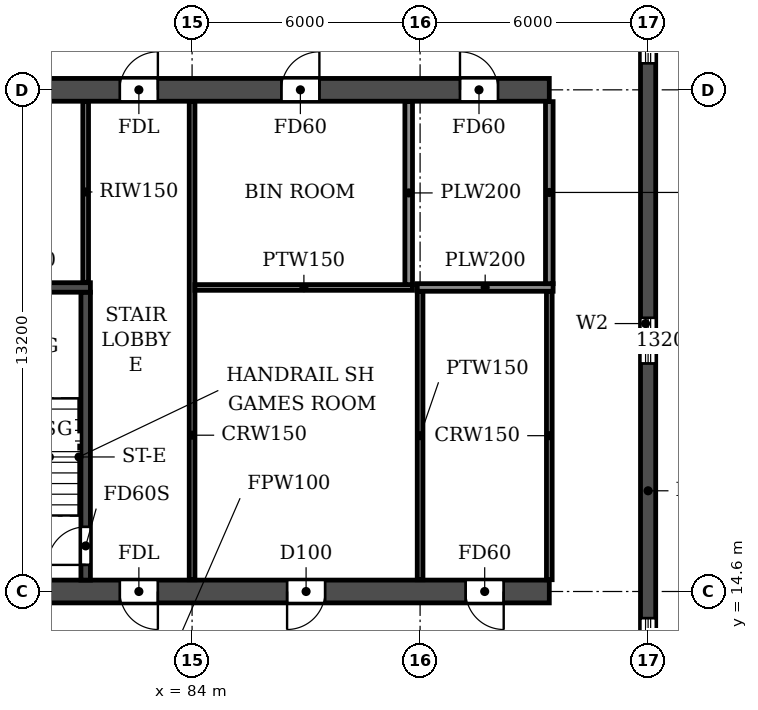
"""IFC4 building model, lengths in metres.
Left out: names, types, materials, properties, quantities, classifications, styles, units other than length and angle.
Written with IfcOpenShell. Run it as: python <this file> out.ifc"""

import sys

from ifc_helpers import new_model, si_unit, direction, frame, frame_2d, origin, place, context, subcontext, project, spatial, rectangle, extrude, element, fill, save


model = new_model("IFC4")
c1 = context("Model", 3, precision=1e-05, world=origin(), true_north=direction((0.0, 1.0)))
c2 = subcontext(c1, "Body", "Model", "MODEL_VIEW")
j1 = project(units=[si_unit("LENGTHUNIT", "METRE"), si_unit("PLANEANGLEUNIT", "RADIAN")], contexts=[c1])
p1 = place(None, origin())
s1 = spatial("IfcSite", under=j1, at=p1, CompositionType="ELEMENT")
p2 = place(p1, origin())
s2 = spatial("IfcBuilding", under=s1, at=p2, CompositionType="ELEMENT")
p3 = place(p2, frame((0.0, 0.0, 56.4)))
s3 = spatial("IfcBuildingStorey", under=s2, at=p3, CompositionType="ELEMENT", Elevation=56.4)
p4 = place(p3, frame((96.0, 4.683, 0.0), z_axis=(0.0, 0.0, 1.0), x_axis=(0.0, 1.0, 0.0)))
e1 = element("IfcWall", 1, at=p4, inside=s3, PredefinedType="SHEAR", context=c2, shape_type="SweptSolid", body=[
    extrude(rectangle(XDim=35.434, YDim=0.4, at=frame_2d((17.717, 0.0))), origin(), (0.0, 0.0, 1.0), 3.05),
])
p5 = place(p4, frame((15.917, 0.0, 0.9)))
e2 = element("IfcOpeningElement", 2, at=p5, cuts=e1, PredefinedType="OPENING", context=c2, shape_type="SweptSolid", body=[
    extrude(rectangle(XDim=1.2, YDim=1.5, at=frame_2d((0.6, 0.75))), frame((0.0, 0.21, 0.0), z_axis=(0.0, -1.0, 0.0), x_axis=(1.0, 0.0, 0.0)), (0.0, 0.0, 1.0), 0.42),
])
p6 = place(p4, frame((23.817, 0.0, 0.9)))
e3 = element("IfcOpeningElement", 3, at=p6, cuts=e1, PredefinedType="OPENING", context=c2, shape_type="SweptSolid", body=[
    extrude(rectangle(XDim=1.2, YDim=1.5, at=frame_2d((0.6, 0.75))), frame((0.0, 0.21, 0.0), z_axis=(0.0, -1.0, 0.0), x_axis=(1.0, 0.0, 0.0)), (0.0, 0.0, 1.0), 0.42),
])
p7 = place(p4, frame((8.017, 0.0, 0.9)))
e4 = element("IfcOpeningElement", 4, at=p7, cuts=e1, PredefinedType="OPENING", context=c2, shape_type="SweptSolid", body=[
    extrude(rectangle(XDim=1.2, YDim=1.5, at=frame_2d((0.6, 0.75))), frame((0.0, 0.21, 0.0), z_axis=(0.0, -1.0, 0.0), x_axis=(1.0, 0.0, 0.0)), (0.0, 0.0, 1.0), 0.42),
])
p8 = place(p4, frame((29.493, 0.0, 0.6)))
e5 = element("IfcOpeningElement", 5, at=p8, cuts=e1, PredefinedType="OPENING", context=c2, shape_type="SweptSolid", body=[
    extrude(rectangle(XDim=2.2, YDim=1.8, at=frame_2d((1.1, 0.9))), frame((0.0, 0.21, 0.0), z_axis=(0.0, -1.0, 0.0), x_axis=(1.0, 0.0, 0.0)), (0.0, 0.0, 1.0), 0.42),
])
p9 = place(p4, frame((2.541, 0.0, 0.6)))
e6 = element("IfcOpeningElement", 6, at=p9, cuts=e1, PredefinedType="OPENING", context=c2, shape_type="SweptSolid", body=[
    extrude(rectangle(XDim=2.2, YDim=1.8, at=frame_2d((1.1, 0.9))), frame((0.0, 0.21, 0.0), z_axis=(0.0, -1.0, 0.0), x_axis=(1.0, 0.0, 0.0)), (0.0, 0.0, 1.0), 0.42),
])
p10 = place(p3, frame((8.6, 14.6, 0.0), z_axis=(0.0, 0.0, 1.0), x_axis=(1.0, 0.0, 0.0)))
e7 = element("IfcWall", 7, at=p10, inside=s3, PredefinedType="SOLIDWALL", context=c2, shape_type="SweptSolid", body=[
    extrude(rectangle(XDim=84.8, YDim=0.6, at=frame_2d((42.4, 0.0))), origin(), (0.0, 0.0, 1.0), 3.05),
])
p11 = place(p10, frame((1.35, 0.0, 0.0)))
e8 = element("IfcOpeningElement", 8, at=p11, cuts=e7, PredefinedType="OPENING", context=c2, shape_type="SweptSolid", body=[
    extrude(rectangle(XDim=1.0, YDim=2.1, at=frame_2d((0.5, 1.05))), frame((0.0, 0.31, 0.0), z_axis=(0.0, -1.0, 0.0), x_axis=(1.0, 0.0, 0.0)), (0.0, 0.0, 1.0), 0.62),
])
p12 = place(p10, frame((6.05, 0.0, 0.0)))
e9 = element("IfcOpeningElement", 9, at=p12, cuts=e7, PredefinedType="OPENING", context=c2, shape_type="SweptSolid", body=[
    extrude(rectangle(XDim=1.0, YDim=2.1, at=frame_2d((0.5, 1.05))), frame((0.0, 0.31, 0.0), z_axis=(0.0, -1.0, 0.0), x_axis=(1.0, 0.0, 0.0)), (0.0, 0.0, 1.0), 0.62),
])
p13 = place(p10, frame((10.3, 0.0, 0.0)))
e10 = element("IfcOpeningElement", 10, at=p13, cuts=e7, PredefinedType="OPENING", context=c2, shape_type="SweptSolid", body=[
    extrude(rectangle(XDim=1.0, YDim=2.1, at=frame_2d((0.5, 1.05))), frame((0.0, 0.31, 0.0), z_axis=(0.0, -1.0, 0.0), x_axis=(1.0, 0.0, 0.0)), (0.0, 0.0, 1.0), 0.62),
])
p14 = place(p10, frame((18.2, 0.0, 0.0)))
e11 = element("IfcOpeningElement", 11, at=p14, cuts=e7, PredefinedType="OPENING", context=c2, shape_type="SweptSolid", body=[
    extrude(rectangle(XDim=1.0, YDim=2.1, at=frame_2d((0.5, 1.05))), frame((0.0, 0.31, 0.0), z_axis=(0.0, -1.0, 0.0), x_axis=(1.0, 0.0, 0.0)), (0.0, 0.0, 1.0), 0.62),
])
p15 = place(p10, frame((22.8, 0.0, 0.0)))
e12 = element("IfcOpeningElement", 12, at=p15, cuts=e7, PredefinedType="OPENING", context=c2, shape_type="SweptSolid", body=[
    extrude(rectangle(XDim=1.0, YDim=2.1, at=frame_2d((0.5, 1.05))), frame((0.0, 0.31, 0.0), z_axis=(0.0, -1.0, 0.0), x_axis=(1.0, 0.0, 0.0)), (0.0, 0.0, 1.0), 0.62),
])
p16 = place(p10, frame((35.4, 0.0, 0.0)))
e13 = element("IfcOpeningElement", 13, at=p16, cuts=e7, PredefinedType="OPENING", context=c2, shape_type="SweptSolid", body=[
    extrude(rectangle(XDim=1.0, YDim=2.1, at=frame_2d((0.5, 1.05))), frame((0.0, 0.31, 0.0), z_axis=(0.0, -1.0, 0.0), x_axis=(1.0, 0.0, 0.0)), (0.0, 0.0, 1.0), 0.62),
])
p17 = place(p10, frame((39.3, 0.0, 0.0)))
e14 = element("IfcOpeningElement", 14, at=p17, cuts=e7, PredefinedType="OPENING", context=c2, shape_type="SweptSolid", body=[
    extrude(rectangle(XDim=1.0, YDim=2.1, at=frame_2d((0.5, 1.05))), frame((0.0, 0.31, 0.0), z_axis=(0.0, -1.0, 0.0), x_axis=(1.0, 0.0, 0.0)), (0.0, 0.0, 1.0), 0.62),
])
p18 = place(p10, frame((41.9, 0.0, 0.0)))
e15 = element("IfcOpeningElement", 15, at=p18, cuts=e7, PredefinedType="OPENING", context=c2, shape_type="SweptSolid", body=[
    extrude(rectangle(XDim=1.0, YDim=2.1, at=frame_2d((0.5, 1.05))), frame((0.0, 0.31, 0.0), z_axis=(0.0, -1.0, 0.0), x_axis=(1.0, 0.0, 0.0)), (0.0, 0.0, 1.0), 0.62),
])
p19 = place(p10, frame((47.1, 0.0, 0.0)))
e16 = element("IfcOpeningElement", 16, at=p19, cuts=e7, PredefinedType="OPENING", context=c2, shape_type="SweptSolid", body=[
    extrude(rectangle(XDim=1.0, YDim=2.1, at=frame_2d((0.5, 1.05))), frame((0.0, 0.31, 0.0), z_axis=(0.0, -1.0, 0.0), x_axis=(1.0, 0.0, 0.0)), (0.0, 0.0, 1.0), 0.62),
])
p20 = place(p10, frame((61.0, 0.0, 0.0)))
e17 = element("IfcOpeningElement", 17, at=p20, cuts=e7, PredefinedType="OPENING", context=c2, shape_type="SweptSolid", body=[
    extrude(rectangle(XDim=1.0, YDim=2.1, at=frame_2d((0.5, 1.05))), frame((0.0, 0.31, 0.0), z_axis=(0.0, -1.0, 0.0), x_axis=(1.0, 0.0, 0.0)), (0.0, 0.0, 1.0), 0.62),
])
p21 = place(p10, frame((65.6, 0.0, 0.0)))
e18 = element("IfcOpeningElement", 18, at=p21, cuts=e7, PredefinedType="OPENING", context=c2, shape_type="SweptSolid", body=[
    extrude(rectangle(XDim=1.0, YDim=2.1, at=frame_2d((0.5, 1.05))), frame((0.0, 0.31, 0.0), z_axis=(0.0, -1.0, 0.0), x_axis=(1.0, 0.0, 0.0)), (0.0, 0.0, 1.0), 0.62),
])
p22 = place(p10, frame((73.5, 0.0, 0.0)))
e19 = element("IfcOpeningElement", 19, at=p22, cuts=e7, PredefinedType="OPENING", context=c2, shape_type="SweptSolid", body=[
    extrude(rectangle(XDim=1.0, YDim=2.1, at=frame_2d((0.5, 1.05))), frame((0.0, 0.31, 0.0), z_axis=(0.0, -1.0, 0.0), x_axis=(1.0, 0.0, 0.0)), (0.0, 0.0, 1.0), 0.62),
])
p23 = place(p10, frame((77.9, 0.0, 0.0)))
e20 = element("IfcOpeningElement", 20, at=p23, cuts=e7, PredefinedType="OPENING", context=c2, shape_type="SweptSolid", body=[
    extrude(rectangle(XDim=1.0, YDim=2.1, at=frame_2d((0.5, 1.05))), frame((0.0, 0.31, 0.0), z_axis=(0.0, -1.0, 0.0), x_axis=(1.0, 0.0, 0.0)), (0.0, 0.0, 1.0), 0.62),
])
p24 = place(p10, frame((82.6, 0.0, 0.0)))
e21 = element("IfcOpeningElement", 21, at=p24, cuts=e7, PredefinedType="OPENING", context=c2, shape_type="SweptSolid", body=[
    extrude(rectangle(XDim=1.0, YDim=2.1, at=frame_2d((0.5, 1.05))), frame((0.0, 0.31, 0.0), z_axis=(0.0, -1.0, 0.0), x_axis=(1.0, 0.0, 0.0)), (0.0, 0.0, 1.0), 0.62),
])
p25 = place(p3, frame((8.6, 27.8, 0.0), z_axis=(0.0, 0.0, 1.0), x_axis=(1.0, 0.0, 0.0)))
e22 = element("IfcWall", 22, at=p25, inside=s3, PredefinedType="SOLIDWALL", context=c2, shape_type="SweptSolid", body=[
    extrude(rectangle(XDim=84.8, YDim=0.6, at=frame_2d((42.4, 0.0))), origin(), (0.0, 0.0, 1.0), 3.05),
])
p26 = place(p25, frame((1.2, 0.0, 0.0)))
e23 = element("IfcOpeningElement", 23, at=p26, cuts=e22, PredefinedType="OPENING", context=c2, shape_type="SweptSolid", body=[
    extrude(rectangle(XDim=1.0, YDim=2.1, at=frame_2d((0.5, 1.05))), frame((0.0, 0.31, 0.0), z_axis=(0.0, -1.0, 0.0), x_axis=(1.0, 0.0, 0.0)), (0.0, 0.0, 1.0), 0.62),
])
p27 = place(p25, frame((5.9, 0.0, 0.0)))
e24 = element("IfcOpeningElement", 24, at=p27, cuts=e22, PredefinedType="OPENING", context=c2, shape_type="SweptSolid", body=[
    extrude(rectangle(XDim=1.0, YDim=2.1, at=frame_2d((0.5, 1.05))), frame((0.0, 0.31, 0.0), z_axis=(0.0, -1.0, 0.0), x_axis=(1.0, 0.0, 0.0)), (0.0, 0.0, 1.0), 0.62),
])
p28 = place(p25, frame((10.3, 0.0, 0.0)))
e25 = element("IfcOpeningElement", 25, at=p28, cuts=e22, PredefinedType="OPENING", context=c2, shape_type="SweptSolid", body=[
    extrude(rectangle(XDim=1.0, YDim=2.1, at=frame_2d((0.5, 1.05))), frame((0.0, 0.31, 0.0), z_axis=(0.0, -1.0, 0.0), x_axis=(1.0, 0.0, 0.0)), (0.0, 0.0, 1.0), 0.62),
])
p29 = place(p25, frame((13.65, 0.0, 0.0)))
e26 = element("IfcOpeningElement", 26, at=p29, cuts=e22, PredefinedType="OPENING", context=c2, shape_type="SweptSolid", body=[
    extrude(rectangle(XDim=0.9, YDim=2.1, at=frame_2d((0.45, 1.05))), frame((0.0, 0.31, 0.0), z_axis=(0.0, -1.0, 0.0), x_axis=(1.0, 0.0, 0.0)), (0.0, 0.0, 1.0), 0.62),
])
p30 = place(p25, frame((22.85, 0.0, 0.0)))
e27 = element("IfcOpeningElement", 27, at=p30, cuts=e22, PredefinedType="OPENING", context=c2, shape_type="SweptSolid", body=[
    extrude(rectangle(XDim=0.9, YDim=2.1, at=frame_2d((0.45, 1.05))), frame((0.0, 0.31, 0.0), z_axis=(0.0, -1.0, 0.0), x_axis=(1.0, 0.0, 0.0)), (0.0, 0.0, 1.0), 0.62),
])
p31 = place(p25, frame((27.3, 0.0, 0.0)))
e28 = element("IfcOpeningElement", 28, at=p31, cuts=e22, PredefinedType="OPENING", context=c2, shape_type="SweptSolid", body=[
    extrude(rectangle(XDim=1.0, YDim=2.1, at=frame_2d((0.5, 1.05))), frame((0.0, 0.31, 0.0), z_axis=(0.0, -1.0, 0.0), x_axis=(1.0, 0.0, 0.0)), (0.0, 0.0, 1.0), 0.62),
])
p32 = place(p25, frame((32.5, 0.0, 0.0)))
e29 = element("IfcOpeningElement", 29, at=p32, cuts=e22, PredefinedType="OPENING", context=c2, shape_type="SweptSolid", body=[
    extrude(rectangle(XDim=1.0, YDim=2.1, at=frame_2d((0.5, 1.05))), frame((0.0, 0.31, 0.0), z_axis=(0.0, -1.0, 0.0), x_axis=(1.0, 0.0, 0.0)), (0.0, 0.0, 1.0), 0.62),
])
p33 = place(p25, frame((39.0, 0.0, 0.0)))
e30 = element("IfcOpeningElement", 30, at=p33, cuts=e22, PredefinedType="OPENING", context=c2, shape_type="SweptSolid", body=[
    extrude(rectangle(XDim=1.0, YDim=2.1, at=frame_2d((0.5, 1.05))), frame((0.0, 0.31, 0.0), z_axis=(0.0, -1.0, 0.0), x_axis=(1.0, 0.0, 0.0)), (0.0, 0.0, 1.0), 0.62),
])
p34 = place(p25, frame((41.9, 0.0, 0.0)))
e31 = element("IfcOpeningElement", 31, at=p34, cuts=e22, PredefinedType="OPENING", context=c2, shape_type="SweptSolid", body=[
    extrude(rectangle(XDim=1.0, YDim=2.1, at=frame_2d((0.5, 1.05))), frame((0.0, 0.31, 0.0), z_axis=(0.0, -1.0, 0.0), x_axis=(1.0, 0.0, 0.0)), (0.0, 0.0, 1.0), 0.62),
])
p35 = place(p25, frame((47.4, 0.0, 0.0)))
e32 = element("IfcOpeningElement", 32, at=p35, cuts=e22, PredefinedType="OPENING", context=c2, shape_type="SweptSolid", body=[
    extrude(rectangle(XDim=1.0, YDim=2.1, at=frame_2d((0.5, 1.05))), frame((0.0, 0.31, 0.0), z_axis=(0.0, -1.0, 0.0), x_axis=(1.0, 0.0, 0.0)), (0.0, 0.0, 1.0), 0.62),
])
p36 = place(p25, frame((53.9, 0.0, 0.0)))
e33 = element("IfcOpeningElement", 33, at=p36, cuts=e22, PredefinedType="OPENING", context=c2, shape_type="SweptSolid", body=[
    extrude(rectangle(XDim=1.0, YDim=2.1, at=frame_2d((0.5, 1.05))), frame((0.0, 0.31, 0.0), z_axis=(0.0, -1.0, 0.0), x_axis=(1.0, 0.0, 0.0)), (0.0, 0.0, 1.0), 0.62),
])
p37 = place(p25, frame((57.8, 0.0, 0.0)))
e34 = element("IfcOpeningElement", 34, at=p37, cuts=e22, PredefinedType="OPENING", context=c2, shape_type="SweptSolid", body=[
    extrude(rectangle(XDim=1.0, YDim=2.1, at=frame_2d((0.5, 1.05))), frame((0.0, 0.31, 0.0), z_axis=(0.0, -1.0, 0.0), x_axis=(1.0, 0.0, 0.0)), (0.0, 0.0, 1.0), 0.62),
])
p38 = place(p25, frame((61.05, 0.0, 0.0)))
e35 = element("IfcOpeningElement", 35, at=p38, cuts=e22, PredefinedType="OPENING", context=c2, shape_type="SweptSolid", body=[
    extrude(rectangle(XDim=0.9, YDim=2.1, at=frame_2d((0.45, 1.05))), frame((0.0, 0.31, 0.0), z_axis=(0.0, -1.0, 0.0), x_axis=(1.0, 0.0, 0.0)), (0.0, 0.0, 1.0), 0.62),
])
p39 = place(p25, frame((70.25, 0.0, 0.0)))
e36 = element("IfcOpeningElement", 36, at=p39, cuts=e22, PredefinedType="OPENING", context=c2, shape_type="SweptSolid", body=[
    extrude(rectangle(XDim=0.9, YDim=2.1, at=frame_2d((0.45, 1.05))), frame((0.0, 0.31, 0.0), z_axis=(0.0, -1.0, 0.0), x_axis=(1.0, 0.0, 0.0)), (0.0, 0.0, 1.0), 0.62),
])
p40 = place(p25, frame((73.5, 0.0, 0.0)))
e37 = element("IfcOpeningElement", 37, at=p40, cuts=e22, PredefinedType="OPENING", context=c2, shape_type="SweptSolid", body=[
    extrude(rectangle(XDim=1.0, YDim=2.1, at=frame_2d((0.5, 1.05))), frame((0.0, 0.31, 0.0), z_axis=(0.0, -1.0, 0.0), x_axis=(1.0, 0.0, 0.0)), (0.0, 0.0, 1.0), 0.62),
])
p41 = place(p25, frame((77.75, 0.0, 0.0)))
e38 = element("IfcOpeningElement", 38, at=p41, cuts=e22, PredefinedType="OPENING", context=c2, shape_type="SweptSolid", body=[
    extrude(rectangle(XDim=1.0, YDim=2.1, at=frame_2d((0.5, 1.05))), frame((0.0, 0.31, 0.0), z_axis=(0.0, -1.0, 0.0), x_axis=(1.0, 0.0, 0.0)), (0.0, 0.0, 1.0), 0.62),
])
p42 = place(p25, frame((82.45, 0.0, 0.0)))
e39 = element("IfcOpeningElement", 39, at=p42, cuts=e22, PredefinedType="OPENING", context=c2, shape_type="SweptSolid", body=[
    extrude(rectangle(XDim=1.0, YDim=2.1, at=frame_2d((0.5, 1.05))), frame((0.0, 0.31, 0.0), z_axis=(0.0, -1.0, 0.0), x_axis=(1.0, 0.0, 0.0)), (0.0, 0.0, 1.0), 0.62),
])
p43 = place(p3, frame((81.2, 14.9, 0.0), z_axis=(0.0, 0.0, 1.0), x_axis=(0.0, 1.0, 0.0)))
e40 = element("IfcWall", 40, at=p43, inside=s3, PredefinedType="SOLIDWALL", context=c2, shape_type="SweptSolid", body=[
    extrude(rectangle(XDim=7.575, YDim=0.25, at=frame_2d((3.788, 0.0))), origin(), (0.0, 0.0, 1.0), 3.05),
])
p44 = place(p43, frame((0.4, 0.0, 0.0)))
e41 = element("IfcOpeningElement", 41, at=p44, cuts=e40, PredefinedType="OPENING", context=c2, shape_type="SweptSolid", body=[
    extrude(rectangle(XDim=1.0, YDim=2.1, at=frame_2d((0.5, 1.05))), frame((0.0, 0.135, 0.0), z_axis=(0.0, -1.0, 0.0), x_axis=(1.0, 0.0, 0.0)), (0.0, 0.0, 1.0), 0.27),
])
p45 = place(p3, frame((77.275, 22.6, 0.0), z_axis=(0.0, 0.0, 1.0), x_axis=(1.0, 0.0, 0.0)))
e42 = element("IfcWall", 42, at=p45, inside=s3, PredefinedType="SOLIDWALL", context=c2, shape_type="SweptSolid", body=[
    extrude(rectangle(XDim=4.05, YDim=0.25, at=frame_2d((2.025, 0.0))), origin(), (0.0, 0.0, 1.0), 3.05),
])
p46 = place(p3, frame((84.0, 14.91, 0.0), z_axis=(0.0, 0.0, 1.0), x_axis=(0.0, 1.0, 0.0)))
e43 = element("IfcWall", 43, at=p46, inside=s3, PredefinedType="PARTITIONING", context=c2, shape_type="SweptSolid", body=[
    extrude(rectangle(XDim=12.58, YDim=0.15, at=frame_2d((6.29, 0.0))), origin(), (0.0, 0.0, 1.0), 3.05),
])
p47 = place(p3, frame((93.4, 14.91, 0.0), z_axis=(0.0, 0.0, 1.0), x_axis=(0.0, 1.0, 0.0)))
e44 = element("IfcWall", 44, at=p47, inside=s3, PredefinedType="PARTITIONING", context=c2, shape_type="SweptSolid", body=[
    extrude(rectangle(XDim=7.59, YDim=0.15, at=frame_2d((3.795, 0.0))), origin(), (0.0, 0.0, 1.0), 3.05),
])
p48 = place(p3, frame((84.075, 22.6, 0.0), z_axis=(0.0, 0.0, 1.0), x_axis=(1.0, 0.0, 0.0)))
e45 = element("IfcWall", 45, at=p48, inside=s3, PredefinedType="PARTITIONING", context=c2, shape_type="SweptSolid", body=[
    extrude(rectangle(XDim=5.725, YDim=0.15, at=frame_2d((2.863, 0.0))), origin(), (0.0, 0.0, 1.0), 3.05),
])
p49 = place(p3, frame((90.0, 14.91, 0.0), z_axis=(0.0, 0.0, 1.0), x_axis=(0.0, 1.0, 0.0)))
e46 = element("IfcWall", 46, at=p49, inside=s3, PredefinedType="PARTITIONING", context=c2, shape_type="SweptSolid", body=[
    extrude(rectangle(XDim=7.59, YDim=0.15, at=frame_2d((3.795, 0.0))), origin(), (0.0, 0.0, 1.0), 3.05),
])
p50 = place(p3, frame((89.925, 22.6, 0.0), z_axis=(0.0, 0.0, 1.0), x_axis=(1.0, 0.0, 0.0)))
e47 = element("IfcWall", 47, at=p50, inside=s3, PredefinedType="PARTITIONING", context=c2, shape_type="SweptSolid", body=[
    extrude(rectangle(XDim=3.575, YDim=0.2, at=frame_2d((1.788, 0.0))), origin(), (0.0, 0.0, 1.0), 3.05),
])
p51 = place(p3, frame((89.7, 22.675, 0.0), z_axis=(0.0, 0.0, 1.0), x_axis=(0.0, 1.0, 0.0)))
e48 = element("IfcWall", 48, at=p51, inside=s3, PredefinedType="PARTITIONING", context=c2, shape_type="SweptSolid", body=[
    extrude(rectangle(XDim=4.815, YDim=0.2, at=frame_2d((2.407, 0.0))), origin(), (0.0, 0.0, 1.0), 3.05),
])
p52 = place(p3, frame((93.4, 22.7, 0.0), z_axis=(0.0, 0.0, 1.0), x_axis=(0.0, 1.0, 0.0)))
e49 = element("IfcWall", 49, at=p52, inside=s3, PredefinedType="PARTITIONING", context=c2, shape_type="SweptSolid", body=[
    extrude(rectangle(XDim=4.79, YDim=0.2, at=frame_2d((2.395, 0.0))), origin(), (0.0, 0.0, 1.0), 3.05),
])
p53 = place(p3, frame((81.2, 22.735, 0.0), z_axis=(0.0, 0.0, 1.0), x_axis=(0.0, 1.0, 0.0)))
e50 = element("IfcWall", 50, at=p53, inside=s3, PredefinedType="PARTITIONING", context=c2, shape_type="SweptSolid", body=[
    extrude(rectangle(XDim=4.755, YDim=0.15, at=frame_2d((2.377, 0.0))), origin(), (0.0, 0.0, 1.0), 3.05),
])
p54 = place(p5, origin())
e51 = element("IfcWindow", 51, at=p54, inside=s3, PartitioningType="SINGLE_PANEL", PredefinedType="WINDOW", context=c2, shape_type="SweptSolid", body=[
    extrude(rectangle(XDim=1.2, YDim=1.5, at=frame_2d((0.6, 0.75))), frame((0.0, 0.03, 0.0), z_axis=(0.0, -1.0, 0.0), x_axis=(1.0, 0.0, 0.0)), (0.0, 0.0, 1.0), 0.06),
])
fill(e2, e51)
p55 = place(p6, origin())
e52 = element("IfcWindow", 52, at=p55, inside=s3, PartitioningType="SINGLE_PANEL", PredefinedType="WINDOW", context=c2, shape_type="SweptSolid", body=[
    extrude(rectangle(XDim=1.2, YDim=1.5, at=frame_2d((0.6, 0.75))), frame((0.0, 0.03, 0.0), z_axis=(0.0, -1.0, 0.0), x_axis=(1.0, 0.0, 0.0)), (0.0, 0.0, 1.0), 0.06),
])
fill(e3, e52)
p56 = place(p7, origin())
e53 = element("IfcWindow", 53, at=p56, inside=s3, PartitioningType="SINGLE_PANEL", PredefinedType="WINDOW", context=c2, shape_type="SweptSolid", body=[
    extrude(rectangle(XDim=1.2, YDim=1.5, at=frame_2d((0.6, 0.75))), frame((0.0, 0.03, 0.0), z_axis=(0.0, -1.0, 0.0), x_axis=(1.0, 0.0, 0.0)), (0.0, 0.0, 1.0), 0.06),
])
fill(e4, e53)
p57 = place(p40, origin())
e54 = element("IfcDoor", 54, at=p57, inside=s3, OperationType="SINGLE_SWING_RIGHT", PredefinedType="DOOR", context=c2, shape_type="SweptSolid", body=[
    extrude(rectangle(XDim=1.0, YDim=2.1, at=frame_2d((0.5, 1.05))), frame((0.0, 0.025, 0.0), z_axis=(0.0, -1.0, 0.0), x_axis=(1.0, 0.0, 0.0)), (0.0, 0.0, 1.0), 0.05),
])
fill(e37, e54)
p58 = place(p41, origin())
e55 = element("IfcDoor", 55, at=p58, inside=s3, OperationType="SINGLE_SWING_RIGHT", PredefinedType="DOOR", context=c2, shape_type="SweptSolid", body=[
    extrude(rectangle(XDim=1.0, YDim=2.1, at=frame_2d((0.5, 1.05))), frame((0.0, 0.025, 0.0), z_axis=(0.0, -1.0, 0.0), x_axis=(1.0, 0.0, 0.0)), (0.0, 0.0, 1.0), 0.05),
])
fill(e38, e55)
p59 = place(p42, origin())
e56 = element("IfcDoor", 56, at=p59, inside=s3, OperationType="SINGLE_SWING_LEFT", PredefinedType="DOOR", context=c2, shape_type="SweptSolid", body=[
    extrude(rectangle(XDim=1.0, YDim=2.1, at=frame_2d((0.5, 1.05))), frame((0.0, 0.025, 0.0), z_axis=(0.0, -1.0, 0.0), x_axis=(1.0, 0.0, 0.0)), (0.0, 0.0, 1.0), 0.05),
])
fill(e39, e56)
p60 = place(p22, frame((1.0, 0.0, 0.0), z_axis=(0.0, 0.0, 1.0), x_axis=(-1.0, 0.0, 0.0)))
e57 = element("IfcDoor", 57, at=p60, inside=s3, OperationType="SINGLE_SWING_LEFT", PredefinedType="DOOR", context=c2, shape_type="SweptSolid", body=[
    extrude(rectangle(XDim=1.0, YDim=2.1, at=frame_2d((0.5, 1.05))), frame((0.0, 0.025, 0.0), z_axis=(0.0, -1.0, 0.0), x_axis=(1.0, 0.0, 0.0)), (0.0, 0.0, 1.0), 0.05),
])
fill(e19, e57)
p61 = place(p23, frame((1.0, 0.0, 0.0), z_axis=(0.0, 0.0, 1.0), x_axis=(-1.0, 0.0, 0.0)))
e58 = element("IfcDoor", 58, at=p61, inside=s3, OperationType="SINGLE_SWING_RIGHT", PredefinedType="DOOR", context=c2, shape_type="SweptSolid", body=[
    extrude(rectangle(XDim=1.0, YDim=2.1, at=frame_2d((0.5, 1.05))), frame((0.0, 0.025, 0.0), z_axis=(0.0, -1.0, 0.0), x_axis=(1.0, 0.0, 0.0)), (0.0, 0.0, 1.0), 0.05),
])
fill(e20, e58)
p62 = place(p24, frame((1.0, 0.0, 0.0), z_axis=(0.0, 0.0, 1.0), x_axis=(-1.0, 0.0, 0.0)))
e59 = element("IfcDoor", 59, at=p62, inside=s3, OperationType="SINGLE_SWING_LEFT", PredefinedType="DOOR", context=c2, shape_type="SweptSolid", body=[
    extrude(rectangle(XDim=1.0, YDim=2.1, at=frame_2d((0.5, 1.05))), frame((0.0, 0.025, 0.0), z_axis=(0.0, -1.0, 0.0), x_axis=(1.0, 0.0, 0.0)), (0.0, 0.0, 1.0), 0.05),
])
fill(e21, e59)
p63 = place(p44, origin())
e60 = element("IfcDoor", 60, at=p63, inside=s3, OperationType="SINGLE_SWING_LEFT", PredefinedType="DOOR", context=c2, shape_type="SweptSolid", body=[
    extrude(rectangle(XDim=1.0, YDim=2.1, at=frame_2d((0.5, 1.05))), frame((0.0, 0.025, 0.0), z_axis=(0.0, -1.0, 0.0), x_axis=(1.0, 0.0, 0.0)), (0.0, 0.0, 1.0), 0.05),
])
fill(e41, e60)
save(model, sys.argv[1])
